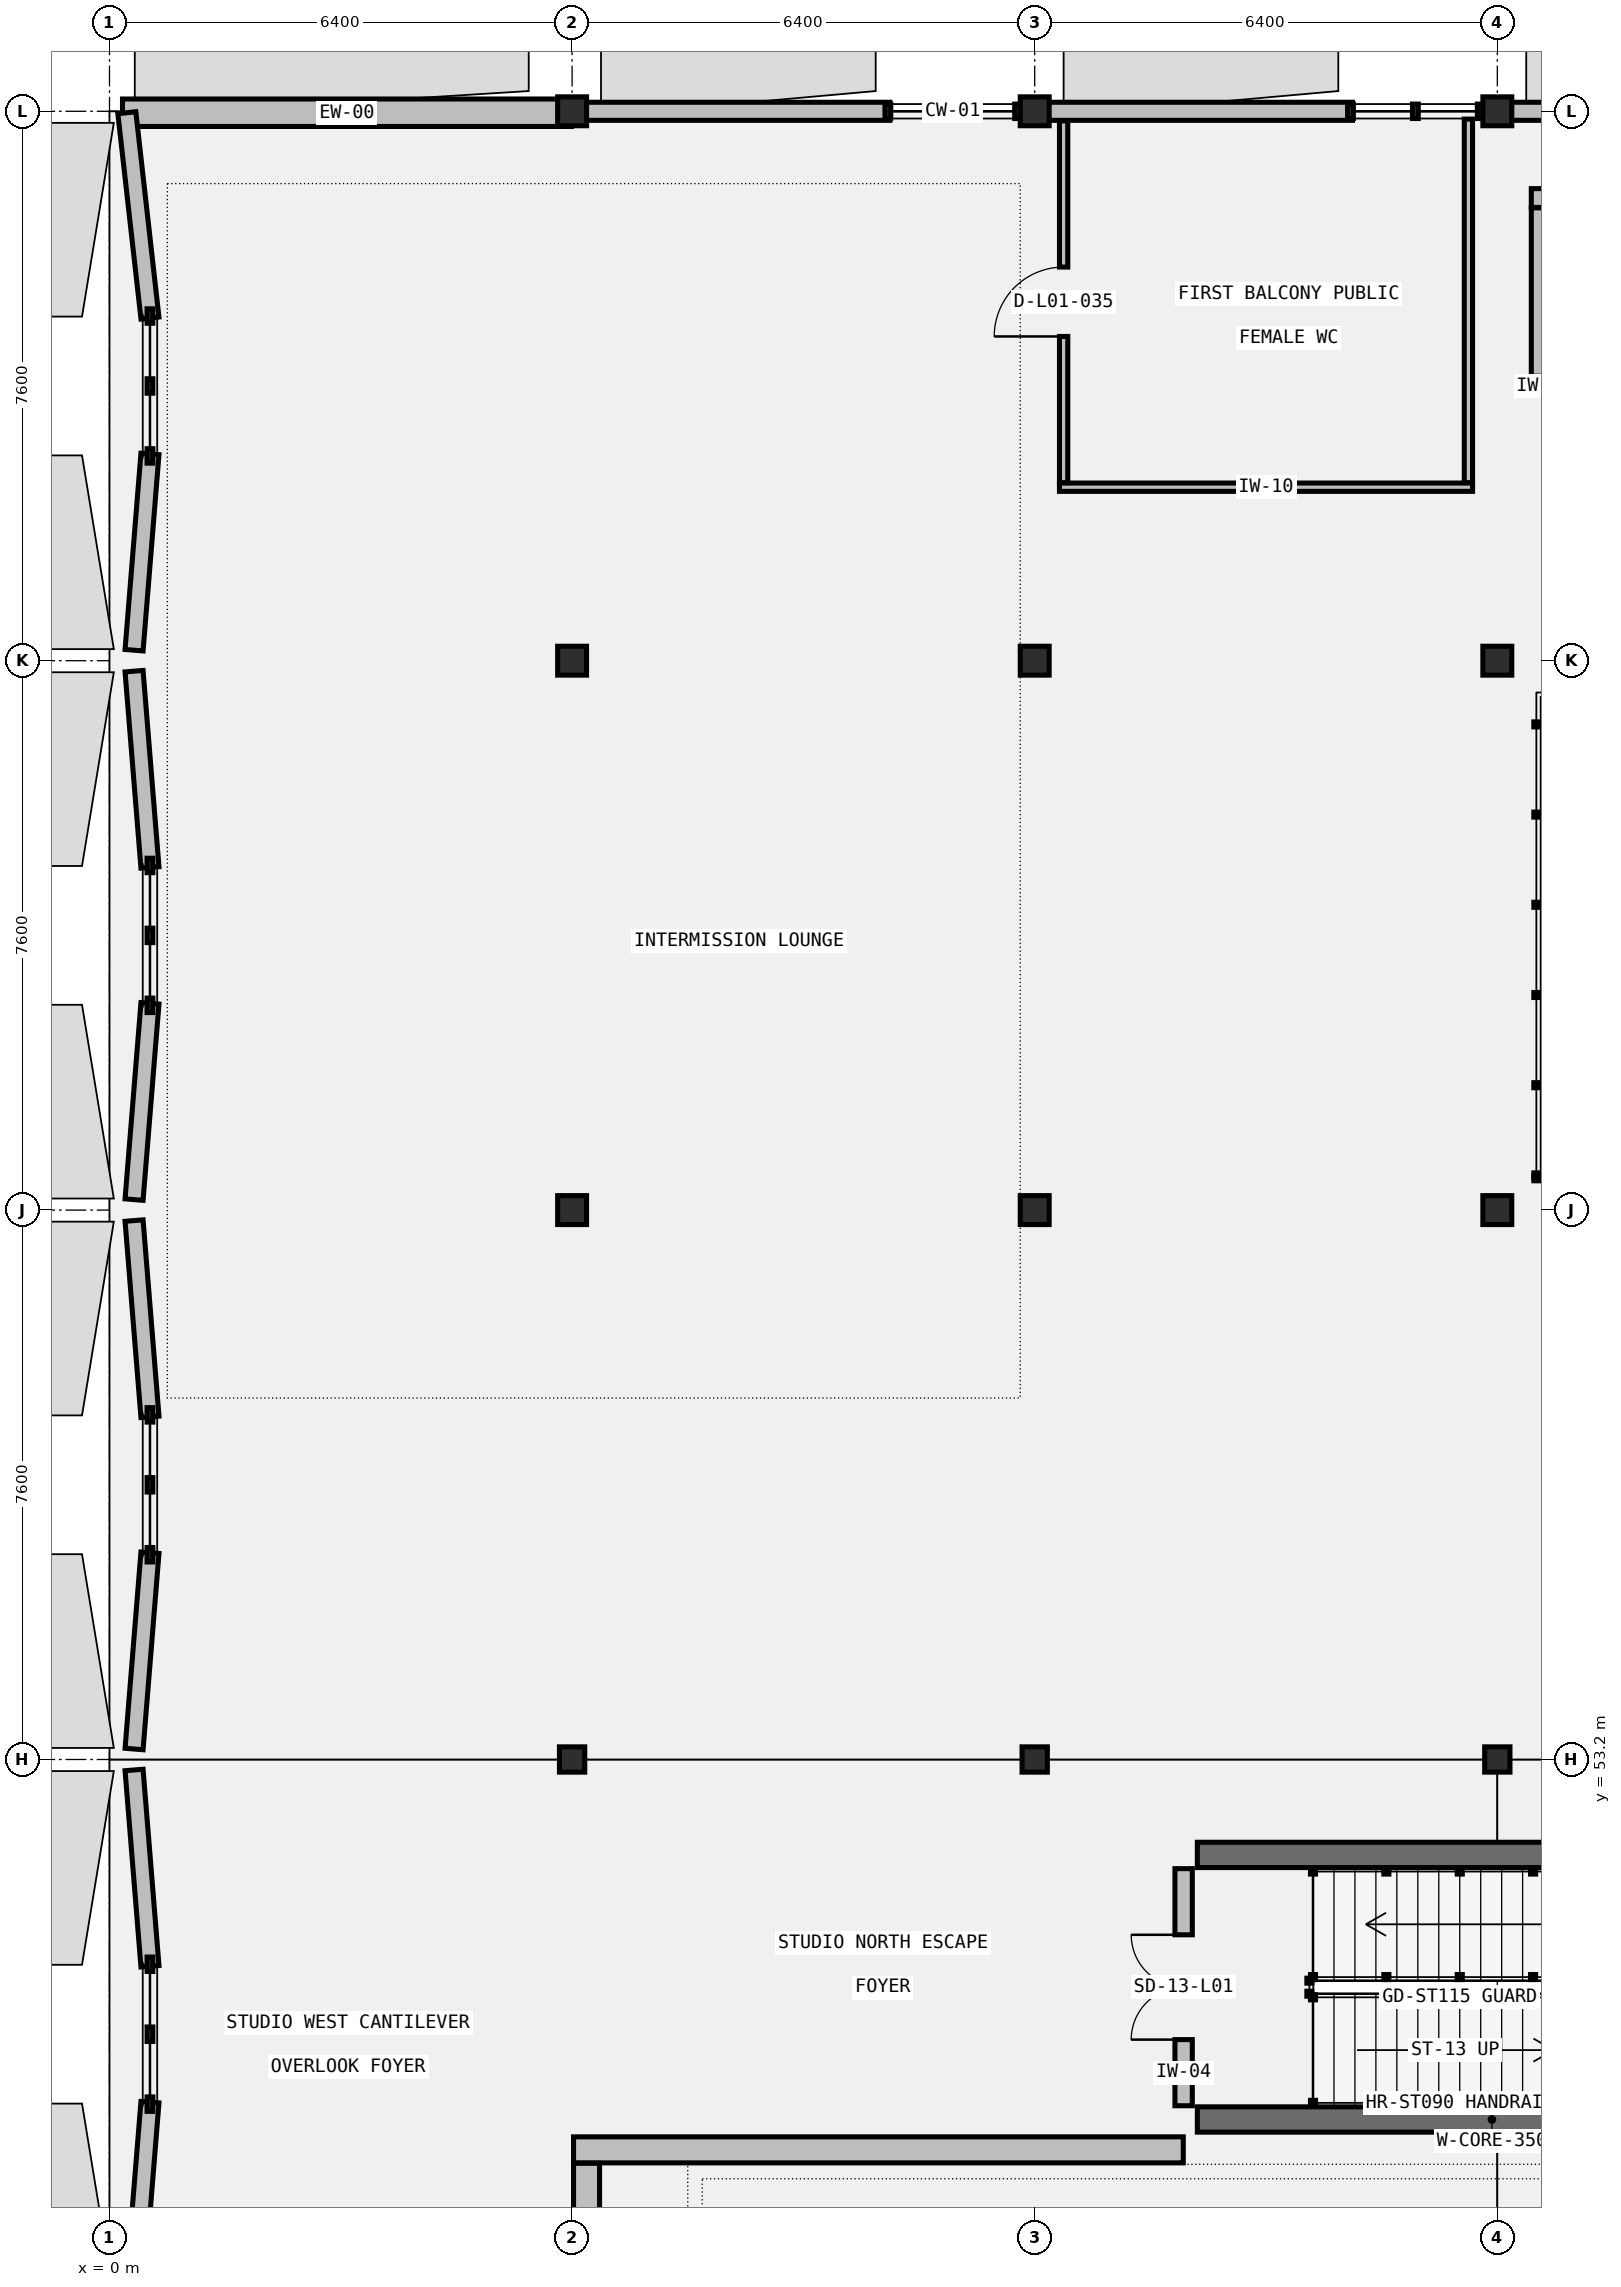
"""IFC4 building model, lengths in metres.
Left out: names, types, materials, properties, quantities, classifications, styles, units other than length and angle.
Written with IfcOpenShell. Run it as: python <this file> out.ifc"""

import sys

from ifc_helpers import new_model, si_unit, direction, frame, frame_2d, origin, origin_2d, place, context, subcontext, project, spatial, rectangle, i_section, extrude, element, fill, save


model = new_model("IFC4")
c1 = context("Model", 3, precision=1e-05, world=origin(), true_north=direction((0.0, 1.0)))
c2 = subcontext(c1, "Body", "Model", "MODEL_VIEW")
j1 = project(units=[si_unit("LENGTHUNIT", "METRE"), si_unit("PLANEANGLEUNIT", "RADIAN")], contexts=[c1])
p1 = place(None, origin())
s1 = spatial("IfcSite", under=j1, at=p1, CompositionType="ELEMENT")
p2 = place(p1, origin())
s2 = spatial("IfcBuilding", under=s1, at=p2, CompositionType="ELEMENT")
p3 = place(p2, frame((0.0, 0.0, 5.4)))
s3 = spatial("IfcBuildingStorey", under=s2, at=p3, CompositionType="ELEMENT", Elevation=5.4)
p4 = place(p3, frame((6.4, 53.2, 0.0), z_axis=(0.0, 0.0, 1.0), x_axis=(1.0, 0.0, 0.0)))
e1 = element("IfcColumn", 1, at=p4, inside=s3, PredefinedType="COLUMN", context=c2, shape_type="SweptSolid", body=[
    extrude(i_section(OverallWidth=0.35, OverallDepth=0.35, WebThickness=0.012, FlangeThickness=0.019, FilletRadius=0.018, at=origin_2d()), origin(), (0.0, 0.0, 1.0), 4.6),
])
for number, where, z_axis, x_axis in (
    (2, (6.4, 60.8, 0.0), (0.0, 0.0, 1.0), (1.0, 0.0, 0.0)),
    (3, (6.4, 68.4, 0.0), (0.0, 0.0, 1.0), (1.0, 0.0, 0.0)),
    (4, (6.4, 76.0, 0.0), (0.0, 0.0, 1.0), (1.0, 0.0, 0.0)),
):
    element("IfcColumn", number, at=place(p3, frame(where, z_axis=z_axis, x_axis=x_axis)), inside=s3, PredefinedType="COLUMN", context=c2, shape_type="SweptSolid", body=[
        extrude(i_section(OverallWidth=0.4, OverallDepth=0.4, WebThickness=0.013, FlangeThickness=0.021, FilletRadius=0.022, at=origin_2d()), origin(), (0.0, 0.0, 1.0), 4.6),
    ])
p5 = place(p3, frame((12.8, 53.2, 0.0), z_axis=(0.0, 0.0, 1.0), x_axis=(1.0, 0.0, 0.0)))
e5 = element("IfcColumn", 5, at=p5, inside=s3, PredefinedType="COLUMN", context=c2, shape_type="SweptSolid", body=[
    extrude(i_section(OverallWidth=0.35, OverallDepth=0.35, WebThickness=0.012, FlangeThickness=0.019, FilletRadius=0.018, at=origin_2d()), origin(), (0.0, 0.0, 1.0), 4.6),
])
for number, where, z_axis, x_axis in (
    (6, (12.8, 60.8, 0.0), (0.0, 0.0, 1.0), (1.0, 0.0, 0.0)),
    (7, (12.8, 68.4, 0.0), (0.0, 0.0, 1.0), (1.0, 0.0, 0.0)),
    (8, (12.8, 76.0, 0.0), (0.0, 0.0, 1.0), (1.0, 0.0, 0.0)),
):
    element("IfcColumn", number, at=place(p3, frame(where, z_axis=z_axis, x_axis=x_axis)), inside=s3, PredefinedType="COLUMN", context=c2, shape_type="SweptSolid", body=[
        extrude(i_section(OverallWidth=0.4, OverallDepth=0.4, WebThickness=0.013, FlangeThickness=0.021, FilletRadius=0.022, at=origin_2d()), origin(), (0.0, 0.0, 1.0), 4.6),
    ])
p6 = place(p3, frame((19.2, 53.2, 0.0), z_axis=(0.0, 0.0, 1.0), x_axis=(1.0, 0.0, 0.0)))
e9 = element("IfcColumn", 9, at=p6, inside=s3, PredefinedType="COLUMN", context=c2, shape_type="SweptSolid", body=[
    extrude(i_section(OverallWidth=0.35, OverallDepth=0.35, WebThickness=0.012, FlangeThickness=0.019, FilletRadius=0.018, at=origin_2d()), origin(), (0.0, 0.0, 1.0), 4.6),
])
for number, where, z_axis, x_axis in (
    (10, (19.2, 60.8, 0.0), (0.0, 0.0, 1.0), (1.0, 0.0, 0.0)),
    (11, (19.2, 68.4, 0.0), (0.0, 0.0, 1.0), (1.0, 0.0, 0.0)),
    (12, (19.2, 76.0, 0.0), (0.0, 0.0, 1.0), (1.0, 0.0, 0.0)),
):
    element("IfcColumn", number, at=place(p3, frame(where, z_axis=z_axis, x_axis=x_axis)), inside=s3, PredefinedType="COLUMN", context=c2, shape_type="SweptSolid", body=[
        extrude(i_section(OverallWidth=0.4, OverallDepth=0.4, WebThickness=0.013, FlangeThickness=0.021, FilletRadius=0.022, at=origin_2d()), origin(), (0.0, 0.0, 1.0), 4.6),
    ])
for number, where, z_axis, x_axis in (
    (13, (15.05, 48.22, 0.0), (0.0, 0.0, 1.0), (1.0, 0.0, 0.0)),
    (14, (23.2, 51.88, 0.0), (0.0, 0.0, 1.0), (-1.0, 0.0, 0.0)),
):
    element("IfcWall", number, at=place(p3, frame(where, z_axis=z_axis, x_axis=x_axis)), inside=s3, PredefinedType="SHEAR", context=c2, shape_type="SweptSolid", body=[
        extrude(rectangle(XDim=8.15, YDim=0.35, at=frame_2d((4.075, 0.0))), origin(), (0.0, 0.0, 1.0), 4.36),
    ])
p7 = place(p3, frame((0.18, 75.98, 0.0), z_axis=(0.0, 0.0, 1.0), x_axis=(1.0, 0.0, 0.0)))
e15 = element("IfcWall", 15, at=p7, inside=s3, PredefinedType="STANDARD", context=c2, shape_type="SweptSolid", body=[
    extrude(rectangle(XDim=6.21, YDim=0.38, at=frame_2d((3.105, 0.0))), origin(), (0.0, 0.0, 1.0), 3.438),
])
for number, where, z_axis, x_axis in (
    (16, (6.41, 76.0, 0.0), (0.0, 0.0, 1.0), (1.0, 0.0, 0.0)),
    (17, (12.81, 76.0, 0.0), (0.0, 0.0, 1.0), (1.0, 0.0, 0.0)),
):
    element("IfcWall", number, at=place(p3, frame(where, z_axis=z_axis, x_axis=x_axis)), inside=s3, PredefinedType="STANDARD", context=c2, shape_type="SweptSolid", body=[
        extrude(rectangle(XDim=4.386, YDim=0.25, at=frame_2d((2.193, 0.0))), origin(), (0.0, 0.0, 1.0), 3.438),
    ])
p8 = place(p3, frame((19.21, 76.0, 0.0), z_axis=(0.0, 0.0, 1.0), x_axis=(1.0, 0.0, 0.0)))
e18 = element("IfcWall", 18, at=p8, inside=s3, PredefinedType="STANDARD", context=c2, shape_type="SweptSolid", body=[
    extrude(rectangle(XDim=6.386, YDim=0.25, at=frame_2d((3.193, 0.0))), origin(), (0.0, 0.0, 1.0), 3.438),
])
for number, where, z_axis, x_axis in (
    (19, (0.34, 45.745, 0.0), (0.0, 0.0, 1.0), (0.081, 0.997, 0.0)),
    (20, (0.56, 50.34, 0.0), (0.0, 0.0, 1.0), (-0.081, 0.997, 0.0)),
):
    element("IfcWall", number, at=place(p3, frame(where, z_axis=z_axis, x_axis=x_axis)), inside=s3, PredefinedType="STANDARD", context=c2, shape_type="SweptSolid", body=[
        extrude(rectangle(XDim=2.724, YDim=0.25, at=frame_2d((1.362, 0.0))), origin(), (0.0, 0.0, 1.0), 3.438),
    ])
for number, where, z_axis, x_axis in (
    (21, (0.34, 53.345, 0.0), (0.0, 0.0, 1.0), (0.081, 0.997, 0.0)),
    (22, (0.56, 57.94, 0.0), (0.0, 0.0, 1.0), (-0.081, 0.997, 0.0)),
):
    element("IfcWall", number, at=place(p3, frame(where, z_axis=z_axis, x_axis=x_axis)), inside=s3, PredefinedType="STANDARD", context=c2, shape_type="SweptSolid", body=[
        extrude(rectangle(XDim=2.724, YDim=0.25, at=frame_2d((1.362, 0.0))), origin(), (0.0, 0.0, 1.0), 3.438),
    ])
for number, where, z_axis, x_axis in (
    (23, (0.34, 60.945, 0.0), (0.0, 0.0, 1.0), (0.081, 0.997, 0.0)),
    (24, (0.56, 65.54, 0.0), (0.0, 0.0, 1.0), (-0.081, 0.997, 0.0)),
):
    element("IfcWall", number, at=place(p3, frame(where, z_axis=z_axis, x_axis=x_axis)), inside=s3, PredefinedType="STANDARD", context=c2, shape_type="SweptSolid", body=[
        extrude(rectangle(XDim=2.724, YDim=0.25, at=frame_2d((1.362, 0.0))), origin(), (0.0, 0.0, 1.0), 3.438),
    ])
p9 = place(p3, frame((0.34, 68.545, 0.0), z_axis=(0.0, 0.0, 1.0), x_axis=(0.080753299301, 0.996734119338, 0.0)))
e25 = element("IfcWall", 25, at=p9, inside=s3, PredefinedType="STANDARD", context=c2, shape_type="SweptSolid", body=[
    extrude(rectangle(XDim=2.724, YDim=0.25, at=frame_2d((1.362, 0.0))), origin(), (0.0, 0.0, 1.0), 3.438),
])
p10 = place(p3, frame((0.56, 73.14, 0.0), z_axis=(0.0, 0.0, 1.0), x_axis=(-0.111987730746, 0.993709589449, 0.0)))
e26 = element("IfcWall", 26, at=p10, inside=s3, PredefinedType="STANDARD", context=c2, shape_type="SweptSolid", body=[
    extrude(rectangle(XDim=2.858, YDim=0.25, at=frame_2d((1.429, 0.0))), origin(), (0.0, 0.0, 1.0), 3.438),
])
p11 = place(p3, frame((14.86, 48.41, 0.0), z_axis=(0.0, 0.0, 1.0), x_axis=(0.0, 1.0, 0.0)))
e27 = element("IfcWall", 27, at=p11, inside=s3, PredefinedType="STANDARD", context=c2, shape_type="SweptSolid", body=[
    extrude(rectangle(XDim=3.28, YDim=0.24, at=frame_2d((1.64, 0.0))), origin(), (0.0, 0.0, 1.0), 4.36),
])
p12 = place(p11, frame((0.915, 0.0, 0.0)))
e28 = element("IfcOpeningElement", 28, at=p12, cuts=e27, PredefinedType="OPENING", context=c2, shape_type="SweptSolid", body=[
    extrude(rectangle(XDim=1.45, YDim=2.2, at=frame_2d((0.725, 1.1))), frame((0.0, 0.13, 0.0), z_axis=(0.0, -1.0, 0.0), x_axis=(1.0, 0.0, 0.0)), (0.0, 0.0, 1.0), 0.26),
])
p13 = place(p3, frame((19.67, 72.2, 0.0), z_axis=(0.0, 0.0, 1.0), x_axis=(1.0, 0.0, 0.0)))
e29 = element("IfcWall", 29, at=p13, inside=s3, PredefinedType="STANDARD", context=c2, shape_type="SweptSolid", body=[
    extrude(rectangle(XDim=3.06, YDim=0.26, at=frame_2d((1.53, 0.0))), origin(), (0.0, 0.0, 1.0), 4.36),
])
p14 = place(p13, frame((0.955, 0.0, 0.0)))
e30 = element("IfcOpeningElement", 30, at=p14, cuts=e29, PredefinedType="OPENING", context=c2, shape_type="SweptSolid", body=[
    extrude(rectangle(XDim=1.15, YDim=2.15, at=frame_2d((0.575, 1.075))), frame((0.0, 0.14, 0.0), z_axis=(0.0, -1.0, 0.0), x_axis=(1.0, 0.0, 0.0)), (0.0, 0.0, 1.0), 0.28),
])
p15 = place(p3, frame((19.67, 74.8, 0.0), z_axis=(0.0, 0.0, 1.0), x_axis=(1.0, 0.0, 0.0)))
e31 = element("IfcWall", 31, at=p15, inside=s3, PredefinedType="STANDARD", context=c2, shape_type="SweptSolid", body=[
    extrude(rectangle(XDim=3.06, YDim=0.26, at=frame_2d((1.53, 0.0))), origin(), (0.0, 0.0, 1.0), 4.36),
])
p16 = place(p3, frame((19.8, 72.336, 0.0), z_axis=(0.0, 0.0, 1.0), x_axis=(0.0, 1.0, 0.0)))
e32 = element("IfcWall", 32, at=p16, inside=s3, PredefinedType="STANDARD", context=c2, shape_type="SweptSolid", body=[
    extrude(rectangle(XDim=2.328, YDim=0.26, at=frame_2d((1.164, 0.0))), origin(), (0.0, 0.0, 1.0), 4.36),
])
p17 = place(p3, frame((13.143, 70.8, 0.0), z_axis=(0.0, 0.0, 1.0), x_axis=(1.0, 0.0, 0.0)))
e33 = element("IfcWall", 33, at=p17, inside=s3, PredefinedType="PARTITIONING", context=c2, shape_type="SweptSolid", body=[
    extrude(rectangle(XDim=5.715, YDim=0.115, at=frame_2d((2.857, 0.0))), origin(), (0.0, 0.0, 1.0), 3.938),
])
p18 = place(p3, frame((13.2, 70.864, 0.0), z_axis=(0.0, 0.0, 1.0), x_axis=(0.0, 1.0, 0.0)))
e34 = element("IfcWall", 34, at=p18, inside=s3, PredefinedType="PARTITIONING", context=c2, shape_type="SweptSolid", body=[
    extrude(rectangle(XDim=5.003, YDim=0.115, at=frame_2d((2.502, 0.0))), origin(), (0.0, 0.0, 1.0), 3.438),
])
p19 = place(p18, frame((2.022, 0.0, 0.0)))
e35 = element("IfcOpeningElement", 35, at=p19, cuts=e34, PredefinedType="OPENING", context=c2, shape_type="SweptSolid", body=[
    extrude(rectangle(XDim=0.96, YDim=2.08, at=frame_2d((0.48, 1.04))), frame((0.0, 0.067, 0.0), z_axis=(0.0, -1.0, 0.0), x_axis=(1.0, 0.0, 0.0)), (0.0, 0.0, 1.0), 0.135),
])
p20 = place(p3, frame((18.8, 70.864, 0.0), z_axis=(0.0, 0.0, 1.0), x_axis=(0.0, 1.0, 0.0)))
e36 = element("IfcWall", 36, at=p20, inside=s3, PredefinedType="PARTITIONING", context=c2, shape_type="SweptSolid", body=[
    extrude(rectangle(XDim=5.029, YDim=0.115, at=frame_2d((2.514, 0.0))), origin(), (0.0, 0.0, 1.0), 3.438),
])
p21 = place(p3, frame((6.42, 47.8, 0.0), z_axis=(0.0, 0.0, 1.0), x_axis=(1.0, 0.0, 0.0)))
e37 = element("IfcWall", 37, at=p21, inside=s3, PredefinedType="PARTITIONING", context=c2, shape_type="SweptSolid", body=[
    extrude(rectangle(XDim=8.435, YDim=0.36, at=frame_2d((4.218, 0.0))), origin(), (0.0, 0.0, 1.0), 3.948),
])
p22 = place(p3, frame((6.6, 45.781, 0.0), z_axis=(0.0, 0.0, 1.0), x_axis=(0.0, 1.0, 0.0)))
e38 = element("IfcWall", 38, at=p22, inside=s3, PredefinedType="PARTITIONING", context=c2, shape_type="SweptSolid", body=[
    extrude(rectangle(XDim=1.833, YDim=0.36, at=frame_2d((0.917, 0.0))), origin(), (0.0, 0.0, 1.0), 3.438),
])
p23 = place(p12, origin())
e39 = element("IfcDoor", 39, at=p23, inside=s3, OperationType="DOUBLE_DOOR_SINGLE_SWING", PredefinedType="DOOR", context=c2, shape_type="SweptSolid", body=[
    extrude(rectangle(XDim=1.45, YDim=2.2, at=frame_2d((0.725, 1.1))), frame((0.0, 0.025, 0.0), z_axis=(0.0, -1.0, 0.0), x_axis=(1.0, 0.0, 0.0)), (0.0, 0.0, 1.0), 0.05),
])
fill(e28, e39)
p24 = place(p19, origin())
e40 = element("IfcDoor", 40, at=p24, inside=s3, OperationType="SINGLE_SWING_LEFT", PredefinedType="DOOR", context=c2, shape_type="SweptSolid", body=[
    extrude(rectangle(XDim=0.96, YDim=2.08, at=frame_2d((0.48, 1.04))), frame((0.0, 0.025, 0.0), z_axis=(0.0, -1.0, 0.0), x_axis=(1.0, 0.0, 0.0)), (0.0, 0.0, 1.0), 0.05),
])
fill(e35, e40)
save(model, sys.argv[1])
